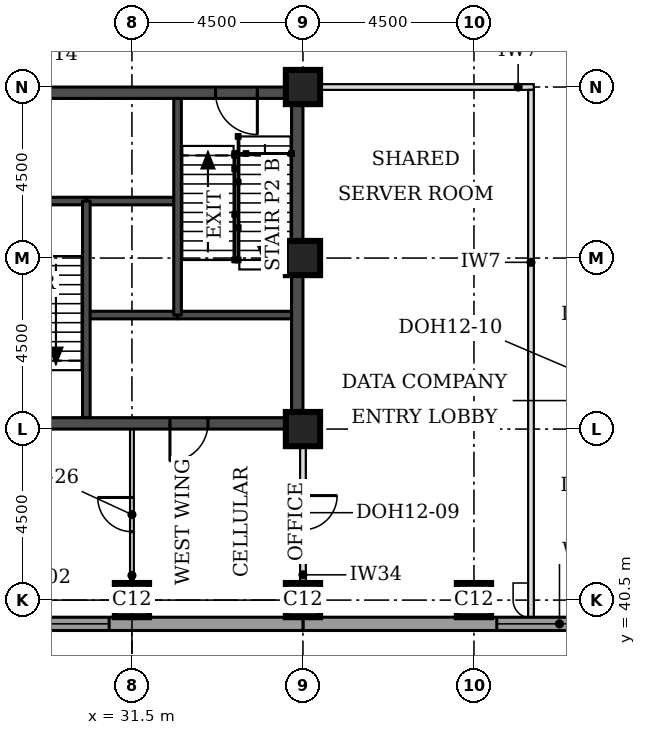
"""IFC4 building model, lengths in metres.
Left out: names, types, materials, properties, quantities, classifications, styles, units other than length and angle.
Written with IfcOpenShell. Run it as: python <this file> out.ifc"""

import sys

from ifc_helpers import new_model, si_unit, direction, frame, frame_2d, origin, origin_2d, place, context, subcontext, project, spatial, rectangle, extrude, element, fill, save


model = new_model("IFC4")
c1 = context("Model", 3, precision=1e-05, world=origin(), true_north=direction((0.0, 1.0)))
c2 = subcontext(c1, "Body", "Model", "MODEL_VIEW")
j1 = project(units=[si_unit("LENGTHUNIT", "METRE"), si_unit("PLANEANGLEUNIT", "RADIAN")], contexts=[c1])
p1 = place(None, origin())
s1 = spatial("IfcSite", under=j1, at=p1, CompositionType="ELEMENT")
p2 = place(p1, origin())
s2 = spatial("IfcBuilding", under=s1, at=p2, CompositionType="ELEMENT")
p3 = place(p2, frame((0.0, 0.0, 245.2)))
s3 = spatial("IfcBuildingStorey", under=s2, at=p3, CompositionType="ELEMENT", Elevation=245.2)
for number, where, z_axis, x_axis in (
    (1, (31.5, 40.5, 0.0), (0.0, 0.0, 1.0), (1.0, 0.0, 0.0)),
    (2, (36.0, 40.5, 0.0), (0.0, 0.0, 1.0), (1.0, 0.0, 0.0)),
    (3, (40.5, 40.5, 0.0), (0.0, 0.0, 1.0), (1.0, 0.0, 0.0)),
    (4, (36.0, 45.0, 0.0), (0.0, 0.0, 1.0), (1.0, 0.0, 0.0)),
    (5, (36.0, 49.5, 0.0), (0.0, 0.0, 1.0), (1.0, 0.0, 0.0)),
    (6, (36.0, 54.0, 0.0), (0.0, 0.0, 1.0), (1.0, 0.0, 0.0)),
):
    element("IfcColumn", number, at=place(p3, frame(where, z_axis=z_axis, x_axis=x_axis)), inside=s3, PredefinedType="COLUMN", context=c2, shape_type="SweptSolid", body=[
        extrude(rectangle(XDim=0.9, YDim=0.9, at=origin_2d()), origin(), (0.0, 0.0, 1.0), 3.7),
    ])
p4 = place(p3, frame((27.3, 45.15, 0.0), z_axis=(0.0, 0.0, 1.0), x_axis=(1.0, 0.0, 0.0)))
e7 = element("IfcWall", 7, at=p4, inside=s3, PredefinedType="SHEAR", context=c2, shape_type="SweptSolid", body=[
    extrude(rectangle(XDim=8.4, YDim=0.3, at=frame_2d((4.2, 0.0))), origin(), (0.0, 0.0, 1.0), 3.7),
])
p5 = place(p4, frame((5.2, 0.0, 0.0)))
e8 = element("IfcOpeningElement", 8, at=p5, cuts=e7, PredefinedType="OPENING", context=c2, shape_type="SweptSolid", body=[
    extrude(rectangle(XDim=1.0, YDim=2.1, at=frame_2d((0.5, 1.05))), frame((0.0, 0.16, 0.0), z_axis=(0.0, -1.0, 0.0), x_axis=(1.0, 0.0, 0.0)), (0.0, 0.0, 1.0), 0.32),
])
p6 = place(p3, frame((27.3, 53.85, 0.0), z_axis=(0.0, 0.0, 1.0), x_axis=(1.0, 0.0, 0.0)))
e9 = element("IfcWall", 9, at=p6, inside=s3, PredefinedType="SHEAR", context=c2, shape_type="SweptSolid", body=[
    extrude(rectangle(XDim=8.4, YDim=0.3, at=frame_2d((4.2, 0.0))), origin(), (0.0, 0.0, 1.0), 3.7),
])
p7 = place(p6, frame((6.4, 0.0, 0.0)))
e10 = element("IfcOpeningElement", 10, at=p7, cuts=e9, PredefinedType="OPENING", context=c2, shape_type="SweptSolid", body=[
    extrude(rectangle(XDim=1.1, YDim=2.1, at=frame_2d((0.55, 1.05))), frame((0.0, 0.16, 0.0), z_axis=(0.0, -1.0, 0.0), x_axis=(1.0, 0.0, 0.0)), (0.0, 0.0, 1.0), 0.32),
])
p8 = place(p3, frame((35.85, 45.0, 0.0), z_axis=(0.0, 0.0, 1.0), x_axis=(0.0, 1.0, 0.0)))
e11 = element("IfcWall", 11, at=p8, inside=s3, PredefinedType="SHEAR", context=c2, shape_type="SweptSolid", body=[
    extrude(rectangle(XDim=9.0, YDim=0.3, at=frame_2d((4.5, 0.0))), origin(), (0.0, 0.0, 1.0), 3.7),
])
p9 = place(p3, frame((36.0, 39.875, 0.0), z_axis=(0.0, 0.0, 1.0), x_axis=(1.0, 0.0, 0.0)))
e12 = element("IfcWall", 12, at=p9, inside=s3, PredefinedType="STANDARD", context=c2, shape_type="SweptSolid", body=[
    extrude(rectangle(XDim=36.331, YDim=0.35, at=frame_2d((18.166, 0.0))), origin(), (0.0, 0.0, 1.0), 3.525),
])
p10 = place(p9, frame((5.1, 0.0, 0.9)))
e13 = element("IfcOpeningElement", 13, at=p10, cuts=e12, PredefinedType="OPENING", context=c2, shape_type="SweptSolid", body=[
    extrude(rectangle(XDim=3.3, YDim=1.9, at=frame_2d((1.65, 0.95))), frame((0.0, 0.185, 0.0), z_axis=(0.0, -1.0, 0.0), x_axis=(1.0, 0.0, 0.0)), (0.0, 0.0, 1.0), 0.37),
])
p11 = place(p9, frame((9.6, 0.0, 0.9)))
e14 = element("IfcOpeningElement", 14, at=p11, cuts=e12, PredefinedType="OPENING", context=c2, shape_type="SweptSolid", body=[
    extrude(rectangle(XDim=3.3, YDim=1.9, at=frame_2d((1.65, 0.95))), frame((0.0, 0.185, 0.0), z_axis=(0.0, -1.0, 0.0), x_axis=(1.0, 0.0, 0.0)), (0.0, 0.0, 1.0), 0.37),
])
p12 = place(p9, frame((14.1, 0.0, 0.9)))
e15 = element("IfcOpeningElement", 15, at=p12, cuts=e12, PredefinedType="OPENING", context=c2, shape_type="SweptSolid", body=[
    extrude(rectangle(XDim=3.3, YDim=1.9, at=frame_2d((1.65, 0.95))), frame((0.0, 0.185, 0.0), z_axis=(0.0, -1.0, 0.0), x_axis=(1.0, 0.0, 0.0)), (0.0, 0.0, 1.0), 0.37),
])
p13 = place(p9, frame((18.6, 0.0, 0.9)))
e16 = element("IfcOpeningElement", 16, at=p13, cuts=e12, PredefinedType="OPENING", context=c2, shape_type="SweptSolid", body=[
    extrude(rectangle(XDim=3.3, YDim=1.9, at=frame_2d((1.65, 0.95))), frame((0.0, 0.185, 0.0), z_axis=(0.0, -1.0, 0.0), x_axis=(1.0, 0.0, 0.0)), (0.0, 0.0, 1.0), 0.37),
])
p14 = place(p9, frame((23.1, 0.0, 0.9)))
e17 = element("IfcOpeningElement", 17, at=p14, cuts=e12, PredefinedType="OPENING", context=c2, shape_type="SweptSolid", body=[
    extrude(rectangle(XDim=3.3, YDim=1.9, at=frame_2d((1.65, 0.95))), frame((0.0, 0.185, 0.0), z_axis=(0.0, -1.0, 0.0), x_axis=(1.0, 0.0, 0.0)), (0.0, 0.0, 1.0), 0.37),
])
p15 = place(p9, frame((27.6, 0.0, 0.9)))
e18 = element("IfcOpeningElement", 18, at=p15, cuts=e12, PredefinedType="OPENING", context=c2, shape_type="SweptSolid", body=[
    extrude(rectangle(XDim=3.3, YDim=1.9, at=frame_2d((1.65, 0.95))), frame((0.0, 0.185, 0.0), z_axis=(0.0, -1.0, 0.0), x_axis=(1.0, 0.0, 0.0)), (0.0, 0.0, 1.0), 0.37),
])
p16 = place(p3, frame((17.669, 39.875, 0.0), z_axis=(0.0, 0.0, 1.0), x_axis=(1.0, 0.0, 0.0)))
e19 = element("IfcWall", 19, at=p16, inside=s3, PredefinedType="STANDARD", context=c2, shape_type="SweptSolid", body=[
    extrude(rectangle(XDim=18.331, YDim=0.35, at=frame_2d((9.166, 0.0))), origin(), (0.0, 0.0, 1.0), 3.525),
])
p17 = place(p16, frame((5.431, 0.0, 0.9)))
e20 = element("IfcOpeningElement", 20, at=p17, cuts=e19, PredefinedType="OPENING", context=c2, shape_type="SweptSolid", body=[
    extrude(rectangle(XDim=3.3, YDim=1.9, at=frame_2d((1.65, 0.95))), frame((0.0, 0.185, 0.0), z_axis=(0.0, -1.0, 0.0), x_axis=(1.0, 0.0, 0.0)), (0.0, 0.0, 1.0), 0.37),
])
p18 = place(p16, frame((9.931, 0.0, 0.9)))
e21 = element("IfcOpeningElement", 21, at=p18, cuts=e19, PredefinedType="OPENING", context=c2, shape_type="SweptSolid", body=[
    extrude(rectangle(XDim=3.3, YDim=1.9, at=frame_2d((1.65, 0.95))), frame((0.0, 0.185, 0.0), z_axis=(0.0, -1.0, 0.0), x_axis=(1.0, 0.0, 0.0)), (0.0, 0.0, 1.0), 0.37),
])
p19 = place(p3, frame((36.45, 54.0, 0.0), z_axis=(0.0, 0.0, 1.0), x_axis=(1.0, 0.0, 0.0)))
e22 = element("IfcWall", 22, at=p19, inside=s3, PredefinedType="PARTITIONING", context=c2, shape_type="SweptSolid", body=[
    extrude(rectangle(XDim=5.625, YDim=0.15, at=frame_2d((2.812, 0.0))), origin(), (0.0, 0.0, 1.0), 3.55),
])
p20 = place(p3, frame((42.0, 40.05, 0.0), z_axis=(0.0, 0.0, 1.0), x_axis=(0.0, 1.0, 0.0)))
e23 = element("IfcWall", 23, at=p20, inside=s3, PredefinedType="PARTITIONING", context=c2, shape_type="SweptSolid", body=[
    extrude(rectangle(XDim=13.875, YDim=0.15, at=frame_2d((6.938, 0.0))), origin(), (0.0, 0.0, 1.0), 3.55),
])
p21 = place(p3, frame((36.0, 40.95, 0.0), z_axis=(0.0, 0.0, 1.0), x_axis=(0.0, 1.0, 0.0)))
e24 = element("IfcWall", 24, at=p21, inside=s3, PredefinedType="PARTITIONING", context=c2, shape_type="SweptSolid", body=[
    extrude(rectangle(XDim=3.63, YDim=0.15, at=frame_2d((1.815, 0.0))), origin(), (0.0, 0.0, 1.0), 2.8),
])
p22 = place(p21, frame((1.4, 0.0, 0.0)))
e25 = element("IfcOpeningElement", 25, at=p22, cuts=e24, PredefinedType="OPENING", context=c2, shape_type="SweptSolid", body=[
    extrude(rectangle(XDim=0.9, YDim=2.1, at=frame_2d((0.45, 1.05))), frame((0.0, 0.085, 0.0), z_axis=(0.0, -1.0, 0.0), x_axis=(1.0, 0.0, 0.0)), (0.0, 0.0, 1.0), 0.17),
])
p23 = place(p3, frame((31.5, 45.0, 0.0), z_axis=(0.0, 0.0, 1.0), x_axis=(0.0, -1.0, 0.0)))
e26 = element("IfcWall", 26, at=p23, inside=s3, PredefinedType="PARTITIONING", context=c2, shape_type="SweptSolid", body=[
    extrude(rectangle(XDim=4.5, YDim=0.1, at=frame_2d((2.25, 0.0))), origin(), (0.0, 0.0, 1.0), 3.55),
])
p24 = place(p23, frame((1.8, 0.0, 0.0)))
e27 = element("IfcOpeningElement", 27, at=p24, cuts=e26, PredefinedType="OPENING", context=c2, shape_type="SweptSolid", body=[
    extrude(rectangle(XDim=0.9, YDim=2.1, at=frame_2d((0.45, 1.05))), frame((0.0, 0.06, 0.0), z_axis=(0.0, -1.0, 0.0), x_axis=(1.0, 0.0, 0.0)), (0.0, 0.0, 1.0), 0.12),
])
p25 = place(p3, frame((30.3, 48.0, 0.0), z_axis=(0.0, 0.0, 1.0), x_axis=(1.0, 0.0, 0.0)))
e28 = element("IfcWall", 28, at=p25, inside=s3, PredefinedType="SOLIDWALL", context=c2, shape_type="SweptSolid", body=[
    extrude(rectangle(XDim=2.4, YDim=0.2, at=frame_2d((1.2, 0.0))), origin(), (0.0, 0.0, 1.0), 3.55),
])
p26 = place(p3, frame((32.7, 48.0, 0.0), z_axis=(0.0, 0.0, 1.0), x_axis=(1.0, 0.0, 0.0)))
e29 = element("IfcWall", 29, at=p26, inside=s3, PredefinedType="SOLIDWALL", context=c2, shape_type="SweptSolid", body=[
    extrude(rectangle(XDim=3.0, YDim=0.2, at=frame_2d((1.5, 0.0))), origin(), (0.0, 0.0, 1.0), 3.55),
])
p27 = place(p3, frame((30.3, 51.0, 0.0), z_axis=(0.0, 0.0, 1.0), x_axis=(1.0, 0.0, 0.0)))
e30 = element("IfcWall", 30, at=p27, inside=s3, PredefinedType="SOLIDWALL", context=c2, shape_type="SweptSolid", body=[
    extrude(rectangle(XDim=2.4, YDim=0.2, at=frame_2d((1.2, 0.0))), origin(), (0.0, 0.0, 1.0), 3.7),
])
p28 = place(p3, frame((27.3, 51.0, 0.0), z_axis=(0.0, 0.0, 1.0), x_axis=(1.0, 0.0, 0.0)))
e31 = element("IfcWall", 31, at=p28, inside=s3, PredefinedType="SOLIDWALL", context=c2, shape_type="SweptSolid", body=[
    extrude(rectangle(XDim=3.0, YDim=0.2, at=frame_2d((1.5, 0.0))), origin(), (0.0, 0.0, 1.0), 3.55),
])
for number, where, z_axis, x_axis in (
    (32, (30.3, 45.3, 0.0), (0.0, 0.0, 1.0), (0.0, 1.0, 0.0)),
    (33, (32.7, 48.0, 0.0), (0.0, 0.0, 1.0), (0.0, 1.0, 0.0)),
):
    element("IfcWall", number, at=place(p3, frame(where, z_axis=z_axis, x_axis=x_axis)), inside=s3, PredefinedType="SOLIDWALL", context=c2, shape_type="SweptSolid", body=[
        extrude(rectangle(XDim=5.7, YDim=0.2, at=frame_2d((2.85, 0.0))), origin(), (0.0, 0.0, 1.0), 3.55),
    ])
p29 = place(p10, origin())
e34 = element("IfcWindow", 34, at=p29, inside=s3, PartitioningType="SINGLE_PANEL", PredefinedType="WINDOW", context=c2, shape_type="SweptSolid", body=[
    extrude(rectangle(XDim=3.3, YDim=1.9, at=frame_2d((1.65, 0.95))), frame((0.0, 0.085, 0.0), z_axis=(0.0, -1.0, 0.0), x_axis=(1.0, 0.0, 0.0)), (0.0, 0.0, 1.0), 0.06),
])
fill(e13, e34)
p30 = place(p18, origin())
e35 = element("IfcWindow", 35, at=p30, inside=s3, PartitioningType="SINGLE_PANEL", PredefinedType="WINDOW", context=c2, shape_type="SweptSolid", body=[
    extrude(rectangle(XDim=3.3, YDim=1.9, at=frame_2d((1.65, 0.95))), frame((0.0, 0.085, 0.0), z_axis=(0.0, -1.0, 0.0), x_axis=(1.0, 0.0, 0.0)), (0.0, 0.0, 1.0), 0.06),
])
fill(e21, e35)
p31 = place(p22, frame((0.9, 0.0, 0.0), z_axis=(0.0, 0.0, 1.0), x_axis=(-1.0, 0.0, 0.0)))
e36 = element("IfcDoor", 36, at=p31, inside=s3, OperationType="SINGLE_SWING_LEFT", PredefinedType="DOOR", context=c2, shape_type="SweptSolid", body=[
    extrude(rectangle(XDim=0.9, YDim=2.1, at=frame_2d((0.45, 1.05))), frame((0.0, 0.025, 0.0), z_axis=(0.0, -1.0, 0.0), x_axis=(1.0, 0.0, 0.0)), (0.0, 0.0, 1.0), 0.05),
])
fill(e25, e36)
p32 = place(p24, frame((0.9, 0.0, 0.0), z_axis=(0.0, 0.0, 1.0), x_axis=(-1.0, 0.0, 0.0)))
e37 = element("IfcDoor", 37, at=p32, inside=s3, OperationType="SINGLE_SWING_RIGHT", PredefinedType="DOOR", context=c2, shape_type="SweptSolid", body=[
    extrude(rectangle(XDim=0.9, YDim=2.1, at=frame_2d((0.45, 1.05))), frame((0.0, 0.025, 0.0), z_axis=(0.0, -1.0, 0.0), x_axis=(1.0, 0.0, 0.0)), (0.0, 0.0, 1.0), 0.05),
])
fill(e27, e37)
p33 = place(p7, frame((1.1, 0.0, 0.0), z_axis=(0.0, 0.0, 1.0), x_axis=(-1.0, 0.0, 0.0)))
e38 = element("IfcDoor", 38, at=p33, inside=s3, OperationType="SINGLE_SWING_LEFT", PredefinedType="DOOR", context=c2, shape_type="SweptSolid", body=[
    extrude(rectangle(XDim=1.1, YDim=2.1, at=frame_2d((0.55, 1.05))), frame((0.0, 0.025, 0.0), z_axis=(0.0, -1.0, 0.0), x_axis=(1.0, 0.0, 0.0)), (0.0, 0.0, 1.0), 0.05),
])
fill(e10, e38)
p34 = place(p5, frame((1.0, 0.0, 0.0), z_axis=(0.0, 0.0, 1.0), x_axis=(-1.0, 0.0, 0.0)))
e39 = element("IfcDoor", 39, at=p34, inside=s3, OperationType="SINGLE_SWING_RIGHT", PredefinedType="DOOR", context=c2, shape_type="SweptSolid", body=[
    extrude(rectangle(XDim=1.0, YDim=2.1, at=frame_2d((0.5, 1.05))), frame((0.0, 0.025, 0.0), z_axis=(0.0, -1.0, 0.0), x_axis=(1.0, 0.0, 0.0)), (0.0, 0.0, 1.0), 0.05),
])
fill(e8, e39)
save(model, sys.argv[1])
